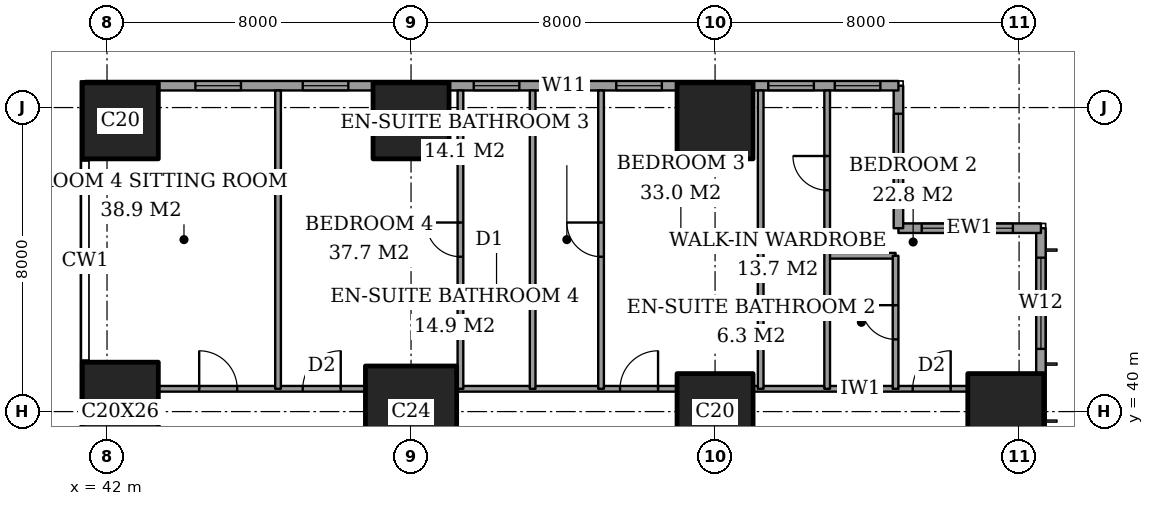
"""IFC4 building model, lengths in metres.
Left out: names, types, materials, properties, quantities, classifications, styles, units other than length and angle.
Written with IfcOpenShell. Run it as: python <this file> out.ifc"""

import sys

from ifc_helpers import new_model, si_unit, direction, frame, frame_2d, origin, origin_2d, place, context, subcontext, project, spatial, rectangle, extrude, element, fill, save


model = new_model("IFC4")
c1 = context("Model", 3, precision=1e-05, world=origin(), true_north=direction((0.0, 1.0)))
c2 = subcontext(c1, "Body", "Model", "MODEL_VIEW")
j1 = project(units=[si_unit("LENGTHUNIT", "METRE"), si_unit("PLANEANGLEUNIT", "RADIAN")], contexts=[c1])
p1 = place(None, origin())
s1 = spatial("IfcSite", under=j1, at=p1, CompositionType="ELEMENT")
p2 = place(p1, origin())
s2 = spatial("IfcBuilding", under=s1, at=p2, CompositionType="ELEMENT")
p3 = place(p2, frame((0.0, 0.0, 161.0)))
s3 = spatial("IfcBuildingStorey", under=s2, at=p3, CompositionType="ELEMENT", Elevation=161.0)
p4 = place(p3, frame((42.35, 40.0, 0.0), z_axis=(0.0, 0.0, 1.0), x_axis=(1.0, 0.0, 0.0)))
e1 = element("IfcColumn", 1, at=p4, inside=s3, PredefinedType="COLUMN", context=c2, shape_type="SweptSolid", body=[
    extrude(rectangle(XDim=2.0, YDim=2.6, at=origin_2d()), origin(), (0.0, 0.0, 1.0), 3.6),
])
p5 = place(p3, frame((42.35, 47.65, 0.0), z_axis=(0.0, 0.0, 1.0), x_axis=(1.0, 0.0, 0.0)))
e2 = element("IfcColumn", 2, at=p5, inside=s3, PredefinedType="COLUMN", context=c2, shape_type="SweptSolid", body=[
    extrude(rectangle(XDim=2.0, YDim=2.0, at=origin_2d()), origin(), (0.0, 0.0, 1.0), 3.6),
])
p6 = place(p3, frame((50.0, 40.0, 0.0), z_axis=(0.0, 0.0, 1.0), x_axis=(1.0, 0.0, 0.0)))
e3 = element("IfcColumn", 3, at=p6, inside=s3, PredefinedType="COLUMN", context=c2, shape_type="SweptSolid", body=[
    extrude(rectangle(XDim=2.4, YDim=2.4, at=origin_2d()), origin(), (0.0, 0.0, 1.0), 3.6),
])
for number, where, z_axis, x_axis in (
    (4, (50.0, 47.65, 0.0), (0.0, 0.0, 1.0), (1.0, 0.0, 0.0)),
    (5, (58.0, 40.0, 0.0), (0.0, 0.0, 1.0), (1.0, 0.0, 0.0)),
    (6, (58.0, 47.65, 0.0), (0.0, 0.0, 1.0), (1.0, 0.0, 0.0)),
    (7, (65.65, 40.0, 0.0), (0.0, 0.0, 1.0), (1.0, 0.0, 0.0)),
):
    element("IfcColumn", number, at=place(p3, frame(where, z_axis=z_axis, x_axis=x_axis)), inside=s3, PredefinedType="COLUMN", context=c2, shape_type="SweptSolid", body=[
        extrude(rectangle(XDim=2.0, YDim=2.0, at=origin_2d()), origin(), (0.0, 0.0, 1.0), 3.6),
    ])
p7 = place(p3, frame((66.575, 3.175, 0.0), z_axis=(0.0, 0.0, 1.0), x_axis=(0.0, 1.0, 0.0)))
e8 = element("IfcWall", 8, at=p7, inside=s3, PredefinedType="SOLIDWALL", context=c2, shape_type="SweptSolid", body=[
    extrude(rectangle(XDim=41.65, YDim=0.25, at=frame_2d((20.825, 0.0))), origin(), (0.0, 0.0, 1.0), 3.6),
])
p8 = place(p7, frame((0.775, 0.0, 0.4)))
e9 = element("IfcOpeningElement", 9, at=p8, cuts=e8, PredefinedType="OPENING", context=c2, shape_type="SweptSolid", body=[
    extrude(rectangle(XDim=2.4, YDim=2.2, at=frame_2d((1.2, 1.1))), frame((0.0, 0.135, 0.0), z_axis=(0.0, -1.0, 0.0), x_axis=(1.0, 0.0, 0.0)), (0.0, 0.0, 1.0), 0.27),
])
p9 = place(p7, frame((6.225, 0.0, 0.4)))
e10 = element("IfcOpeningElement", 10, at=p9, cuts=e8, PredefinedType="OPENING", context=c2, shape_type="SweptSolid", body=[
    extrude(rectangle(XDim=1.2, YDim=2.2, at=frame_2d((0.6, 1.1))), frame((0.0, 0.135, 0.0), z_axis=(0.0, -1.0, 0.0), x_axis=(1.0, 0.0, 0.0)), (0.0, 0.0, 1.0), 0.27),
])
p10 = place(p7, frame((8.475, 0.0, 0.4)))
e11 = element("IfcOpeningElement", 11, at=p10, cuts=e8, PredefinedType="OPENING", context=c2, shape_type="SweptSolid", body=[
    extrude(rectangle(XDim=2.4, YDim=2.2, at=frame_2d((1.2, 1.1))), frame((0.0, 0.135, 0.0), z_axis=(0.0, -1.0, 0.0), x_axis=(1.0, 0.0, 0.0)), (0.0, 0.0, 1.0), 0.27),
])
p11 = place(p7, frame((15.775, 0.0, 0.4)))
e12 = element("IfcOpeningElement", 12, at=p11, cuts=e8, PredefinedType="OPENING", context=c2, shape_type="SweptSolid", body=[
    extrude(rectangle(XDim=2.4, YDim=2.2, at=frame_2d((1.2, 1.1))), frame((0.0, 0.135, 0.0), z_axis=(0.0, -1.0, 0.0), x_axis=(1.0, 0.0, 0.0)), (0.0, 0.0, 1.0), 0.27),
])
p12 = place(p7, frame((23.475, 0.0, 0.4)))
e13 = element("IfcOpeningElement", 13, at=p12, cuts=e8, PredefinedType="OPENING", context=c2, shape_type="SweptSolid", body=[
    extrude(rectangle(XDim=2.4, YDim=2.2, at=frame_2d((1.2, 1.1))), frame((0.0, 0.135, 0.0), z_axis=(0.0, -1.0, 0.0), x_axis=(1.0, 0.0, 0.0)), (0.0, 0.0, 1.0), 0.27),
])
p13 = place(p7, frame((30.975, 0.0, 0.4)))
e14 = element("IfcOpeningElement", 14, at=p13, cuts=e8, PredefinedType="OPENING", context=c2, shape_type="SweptSolid", body=[
    extrude(rectangle(XDim=2.4, YDim=2.2, at=frame_2d((1.2, 1.1))), frame((0.0, 0.135, 0.0), z_axis=(0.0, -1.0, 0.0), x_axis=(1.0, 0.0, 0.0)), (0.0, 0.0, 1.0), 0.27),
])
p14 = place(p7, frame((34.5, 0.0, 0.4)))
e15 = element("IfcOpeningElement", 15, at=p14, cuts=e8, PredefinedType="OPENING", context=c2, shape_type="SweptSolid", body=[
    extrude(rectangle(XDim=1.2, YDim=2.2, at=frame_2d((0.6, 1.1))), frame((0.0, 0.135, 0.0), z_axis=(0.0, -1.0, 0.0), x_axis=(1.0, 0.0, 0.0)), (0.0, 0.0, 1.0), 0.27),
])
p15 = place(p7, frame((38.475, 0.0, 0.4)))
e16 = element("IfcOpeningElement", 16, at=p15, cuts=e8, PredefinedType="OPENING", context=c2, shape_type="SweptSolid", body=[
    extrude(rectangle(XDim=2.4, YDim=2.2, at=frame_2d((1.2, 1.1))), frame((0.0, 0.135, 0.0), z_axis=(0.0, -1.0, 0.0), x_axis=(1.0, 0.0, 0.0)), (0.0, 0.0, 1.0), 0.27),
])
p16 = place(p3, frame((66.575, 44.825, 0.0), z_axis=(0.0, 0.0, 1.0), x_axis=(-1.0, 0.0, 0.0)))
e17 = element("IfcWall", 17, at=p16, inside=s3, PredefinedType="SOLIDWALL", context=c2, shape_type="SweptSolid", body=[
    extrude(rectangle(XDim=3.75, YDim=0.25, at=frame_2d((1.875, 0.0))), origin(), (0.0, 0.0, 1.0), 3.6),
])
p17 = place(p16, frame((0.738, 0.0, 0.4)))
e18 = element("IfcOpeningElement", 18, at=p17, cuts=e17, PredefinedType="OPENING", context=c2, shape_type="SweptSolid", body=[
    extrude(rectangle(XDim=2.4, YDim=2.2, at=frame_2d((1.2, 1.1))), frame((0.0, 0.135, 0.0), z_axis=(0.0, -1.0, 0.0), x_axis=(1.0, 0.0, 0.0)), (0.0, 0.0, 1.0), 0.27),
])
p18 = place(p3, frame((62.825, 44.825, 0.0), z_axis=(0.0, 0.0, 1.0), x_axis=(0.0, 1.0, 0.0)))
e19 = element("IfcWall", 19, at=p18, inside=s3, PredefinedType="SOLIDWALL", context=c2, shape_type="SweptSolid", body=[
    extrude(rectangle(XDim=3.75, YDim=0.25, at=frame_2d((1.875, 0.0))), origin(), (0.0, 0.0, 1.0), 3.6),
])
p19 = place(p18, frame((0.613, 0.0, 0.4)))
e20 = element("IfcOpeningElement", 20, at=p19, cuts=e19, PredefinedType="OPENING", context=c2, shape_type="SweptSolid", body=[
    extrude(rectangle(XDim=2.4, YDim=2.2, at=frame_2d((1.2, 1.1))), frame((0.0, 0.135, 0.0), z_axis=(0.0, -1.0, 0.0), x_axis=(1.0, 0.0, 0.0)), (0.0, 0.0, 1.0), 0.27),
])
p20 = place(p3, frame((62.825, 48.575, 0.0), z_axis=(0.0, 0.0, 1.0), x_axis=(-1.0, 0.0, 0.0)))
e21 = element("IfcWall", 21, at=p20, inside=s3, PredefinedType="SOLIDWALL", context=c2, shape_type="SweptSolid", body=[
    extrude(rectangle(XDim=21.4, YDim=0.25, at=frame_2d((10.7, 0.0))), origin(), (0.0, 0.0, 1.0), 3.6),
])
p21 = place(p20, frame((0.475, 0.0, 0.4)))
e22 = element("IfcOpeningElement", 22, at=p21, cuts=e21, PredefinedType="OPENING", context=c2, shape_type="SweptSolid", body=[
    extrude(rectangle(XDim=1.2, YDim=2.2, at=frame_2d((0.6, 1.1))), frame((0.0, 0.135, 0.0), z_axis=(0.0, -1.0, 0.0), x_axis=(1.0, 0.0, 0.0)), (0.0, 0.0, 1.0), 0.27),
])
p22 = place(p20, frame((2.225, 0.0, 0.4)))
e23 = element("IfcOpeningElement", 23, at=p22, cuts=e21, PredefinedType="OPENING", context=c2, shape_type="SweptSolid", body=[
    extrude(rectangle(XDim=1.2, YDim=2.2, at=frame_2d((0.6, 1.1))), frame((0.0, 0.135, 0.0), z_axis=(0.0, -1.0, 0.0), x_axis=(1.0, 0.0, 0.0)), (0.0, 0.0, 1.0), 0.27),
])
p23 = place(p20, frame((6.225, 0.0, 0.4)))
e24 = element("IfcOpeningElement", 24, at=p23, cuts=e21, PredefinedType="OPENING", context=c2, shape_type="SweptSolid", body=[
    extrude(rectangle(XDim=1.2, YDim=2.2, at=frame_2d((0.6, 1.1))), frame((0.0, 0.135, 0.0), z_axis=(0.0, -1.0, 0.0), x_axis=(1.0, 0.0, 0.0)), (0.0, 0.0, 1.0), 0.27),
])
p24 = place(p20, frame((8.2, 0.0, 0.4)))
e25 = element("IfcOpeningElement", 25, at=p24, cuts=e21, PredefinedType="OPENING", context=c2, shape_type="SweptSolid", body=[
    extrude(rectangle(XDim=1.2, YDim=2.2, at=frame_2d((0.6, 1.1))), frame((0.0, 0.135, 0.0), z_axis=(0.0, -1.0, 0.0), x_axis=(1.0, 0.0, 0.0)), (0.0, 0.0, 1.0), 0.27),
])
p25 = place(p20, frame((9.975, 0.0, 0.4)))
e26 = element("IfcOpeningElement", 26, at=p25, cuts=e21, PredefinedType="OPENING", context=c2, shape_type="SweptSolid", body=[
    extrude(rectangle(XDim=1.2, YDim=2.2, at=frame_2d((0.6, 1.1))), frame((0.0, 0.135, 0.0), z_axis=(0.0, -1.0, 0.0), x_axis=(1.0, 0.0, 0.0)), (0.0, 0.0, 1.0), 0.27),
])
p26 = place(p20, frame((14.475, 0.0, 0.4)))
e27 = element("IfcOpeningElement", 27, at=p26, cuts=e21, PredefinedType="OPENING", context=c2, shape_type="SweptSolid", body=[
    extrude(rectangle(XDim=1.2, YDim=2.2, at=frame_2d((0.6, 1.1))), frame((0.0, 0.135, 0.0), z_axis=(0.0, -1.0, 0.0), x_axis=(1.0, 0.0, 0.0)), (0.0, 0.0, 1.0), 0.27),
])
p27 = place(p20, frame((17.3, 0.0, 0.4)))
e28 = element("IfcOpeningElement", 28, at=p27, cuts=e21, PredefinedType="OPENING", context=c2, shape_type="SweptSolid", body=[
    extrude(rectangle(XDim=1.2, YDim=2.2, at=frame_2d((0.6, 1.1))), frame((0.0, 0.135, 0.0), z_axis=(0.0, -1.0, 0.0), x_axis=(1.0, 0.0, 0.0)), (0.0, 0.0, 1.0), 0.27),
])
p28 = place(p3, frame((43.35, 40.6, 0.0), z_axis=(0.0, 0.0, 1.0), x_axis=(1.0, 0.0, 0.0)))
e29 = element("IfcWall", 29, at=p28, inside=s3, PredefinedType="PARTITIONING", context=c2, shape_type="SweptSolid", body=[
    extrude(rectangle(XDim=5.45, YDim=0.15, at=frame_2d((2.725, 0.0))), origin(), (0.0, 0.0, 1.0), 3.35),
])
p29 = place(p28, frame((3.8, 0.0, 0.0)))
e30 = element("IfcOpeningElement", 30, at=p29, cuts=e29, PredefinedType="OPENING", context=c2, shape_type="SweptSolid", body=[
    extrude(rectangle(XDim=1.0, YDim=2.1, at=frame_2d((0.5, 1.05))), frame((0.0, 0.085, 0.0), z_axis=(0.0, -1.0, 0.0), x_axis=(1.0, 0.0, 0.0)), (0.0, 0.0, 1.0), 0.17),
])
p30 = place(p28, frame((1.075, 0.0, 0.0)))
e31 = element("IfcOpeningElement", 31, at=p30, cuts=e29, PredefinedType="OPENING", context=c2, shape_type="SweptSolid", body=[
    extrude(rectangle(XDim=1.0, YDim=2.1, at=frame_2d((0.5, 1.05))), frame((0.0, 0.085, 0.0), z_axis=(0.0, -1.0, 0.0), x_axis=(1.0, 0.0, 0.0)), (0.0, 0.0, 1.0), 0.17),
])
p31 = place(p3, frame((51.2, 40.6, 0.0), z_axis=(0.0, 0.0, 1.0), x_axis=(1.0, 0.0, 0.0)))
e32 = element("IfcWall", 32, at=p31, inside=s3, PredefinedType="PARTITIONING", context=c2, shape_type="SweptSolid", body=[
    extrude(rectangle(XDim=5.8, YDim=0.15, at=frame_2d((2.9, 0.0))), origin(), (0.0, 0.0, 1.0), 3.35),
])
p32 = place(p31, frame((4.3, 0.0, 0.0)))
e33 = element("IfcOpeningElement", 33, at=p32, cuts=e32, PredefinedType="OPENING", context=c2, shape_type="SweptSolid", body=[
    extrude(rectangle(XDim=1.0, YDim=2.1, at=frame_2d((0.5, 1.05))), frame((0.0, 0.085, 0.0), z_axis=(0.0, -1.0, 0.0), x_axis=(1.0, 0.0, 0.0)), (0.0, 0.0, 1.0), 0.17),
])
p33 = place(p3, frame((59.0, 40.6, 0.0), z_axis=(0.0, 0.0, 1.0), x_axis=(1.0, 0.0, 0.0)))
e34 = element("IfcWall", 34, at=p33, inside=s3, PredefinedType="PARTITIONING", context=c2, shape_type="SweptSolid", body=[
    extrude(rectangle(XDim=5.65, YDim=0.15, at=frame_2d((2.825, 0.0))), origin(), (0.0, 0.0, 1.0), 3.35),
])
p34 = place(p33, frame((4.2, 0.0, 0.0)))
e35 = element("IfcOpeningElement", 35, at=p34, cuts=e34, PredefinedType="OPENING", context=c2, shape_type="SweptSolid", body=[
    extrude(rectangle(XDim=1.0, YDim=2.1, at=frame_2d((0.5, 1.05))), frame((0.0, 0.085, 0.0), z_axis=(0.0, -1.0, 0.0), x_axis=(1.0, 0.0, 0.0)), (0.0, 0.0, 1.0), 0.17),
])
p35 = place(p3, frame((60.95, 44.1, 0.0), z_axis=(0.0, 0.0, 1.0), x_axis=(1.0, 0.0, 0.0)))
e36 = element("IfcWall", 36, at=p35, inside=s3, PredefinedType="PARTITIONING", context=c2, shape_type="SweptSolid", body=[
    extrude(rectangle(XDim=1.8, YDim=0.15, at=frame_2d((0.9, 0.0))), origin(), (0.0, 0.0, 1.0), 3.35),
])
p36 = place(p3, frame((46.5, 40.6, 0.0), z_axis=(0.0, 0.0, 1.0), x_axis=(0.0, 1.0, 0.0)))
e37 = element("IfcWall", 37, at=p36, inside=s3, PredefinedType="PARTITIONING", context=c2, shape_type="SweptSolid", body=[
    extrude(rectangle(XDim=7.85, YDim=0.15, at=frame_2d((3.925, 0.0))), origin(), (0.0, 0.0, 1.0), 3.35),
])
p37 = place(p3, frame((51.3, 40.6, 0.0), z_axis=(0.0, 0.0, 1.0), x_axis=(0.0, 1.0, 0.0)))
e38 = element("IfcWall", 38, at=p37, inside=s3, PredefinedType="PARTITIONING", context=c2, shape_type="SweptSolid", body=[
    extrude(rectangle(XDim=7.85, YDim=0.15, at=frame_2d((3.925, 0.0))), origin(), (0.0, 0.0, 1.0), 3.35),
])
p38 = place(p37, frame((3.475, 0.0, 0.0)))
e39 = element("IfcOpeningElement", 39, at=p38, cuts=e38, PredefinedType="OPENING", context=c2, shape_type="SweptSolid", body=[
    extrude(rectangle(XDim=0.9, YDim=2.1, at=frame_2d((0.45, 1.05))), frame((0.0, 0.085, 0.0), z_axis=(0.0, -1.0, 0.0), x_axis=(1.0, 0.0, 0.0)), (0.0, 0.0, 1.0), 0.17),
])
p39 = place(p3, frame((53.2, 40.6, 0.0), z_axis=(0.0, 0.0, 1.0), x_axis=(0.0, 1.0, 0.0)))
e40 = element("IfcWall", 40, at=p39, inside=s3, PredefinedType="PARTITIONING", context=c2, shape_type="SweptSolid", body=[
    extrude(rectangle(XDim=7.85, YDim=0.15, at=frame_2d((3.925, 0.0))), origin(), (0.0, 0.0, 1.0), 3.35),
])
p40 = place(p3, frame((55.0, 40.6, 0.0), z_axis=(0.0, 0.0, 1.0), x_axis=(0.0, 1.0, 0.0)))
e41 = element("IfcWall", 41, at=p40, inside=s3, PredefinedType="PARTITIONING", context=c2, shape_type="SweptSolid", body=[
    extrude(rectangle(XDim=7.85, YDim=0.15, at=frame_2d((3.925, 0.0))), origin(), (0.0, 0.0, 1.0), 3.35),
])
p41 = place(p40, frame((3.475, 0.0, 0.0)))
e42 = element("IfcOpeningElement", 42, at=p41, cuts=e41, PredefinedType="OPENING", context=c2, shape_type="SweptSolid", body=[
    extrude(rectangle(XDim=0.9, YDim=2.1, at=frame_2d((0.45, 1.05))), frame((0.0, 0.085, 0.0), z_axis=(0.0, -1.0, 0.0), x_axis=(1.0, 0.0, 0.0)), (0.0, 0.0, 1.0), 0.17),
])
p42 = place(p3, frame((59.2, 40.6, 0.0), z_axis=(0.0, 0.0, 1.0), x_axis=(0.0, 1.0, 0.0)))
e43 = element("IfcWall", 43, at=p42, inside=s3, PredefinedType="PARTITIONING", context=c2, shape_type="SweptSolid", body=[
    extrude(rectangle(XDim=7.85, YDim=0.15, at=frame_2d((3.925, 0.0))), origin(), (0.0, 0.0, 1.0), 3.35),
])
p43 = place(p3, frame((60.95, 40.6, 0.0), z_axis=(0.0, 0.0, 1.0), x_axis=(0.0, 1.0, 0.0)))
e44 = element("IfcWall", 44, at=p43, inside=s3, PredefinedType="PARTITIONING", context=c2, shape_type="SweptSolid", body=[
    extrude(rectangle(XDim=7.85, YDim=0.15, at=frame_2d((3.925, 0.0))), origin(), (0.0, 0.0, 1.0), 3.35),
])
p44 = place(p43, frame((5.225, 0.0, 0.0)))
e45 = element("IfcOpeningElement", 45, at=p44, cuts=e44, PredefinedType="OPENING", context=c2, shape_type="SweptSolid", body=[
    extrude(rectangle(XDim=0.9, YDim=2.1, at=frame_2d((0.45, 1.05))), frame((0.0, 0.085, 0.0), z_axis=(0.0, -1.0, 0.0), x_axis=(1.0, 0.0, 0.0)), (0.0, 0.0, 1.0), 0.17),
])
p45 = place(p3, frame((62.75, 40.6, 0.0), z_axis=(0.0, 0.0, 1.0), x_axis=(0.0, 1.0, 0.0)))
e46 = element("IfcWall", 46, at=p45, inside=s3, PredefinedType="PARTITIONING", context=c2, shape_type="SweptSolid", body=[
    extrude(rectangle(XDim=3.5, YDim=0.15, at=frame_2d((1.75, 0.0))), origin(), (0.0, 0.0, 1.0), 3.35),
])
p46 = place(p45, frame((1.3, 0.0, 0.0)))
e47 = element("IfcOpeningElement", 47, at=p46, cuts=e46, PredefinedType="OPENING", context=c2, shape_type="SweptSolid", body=[
    extrude(rectangle(XDim=0.9, YDim=2.1, at=frame_2d((0.45, 1.05))), frame((0.0, 0.085, 0.0), z_axis=(0.0, -1.0, 0.0), x_axis=(1.0, 0.0, 0.0)), (0.0, 0.0, 1.0), 0.17),
])
p47 = place(p15, origin())
e48 = element("IfcWindow", 48, at=p47, inside=s3, PartitioningType="SINGLE_PANEL", PredefinedType="WINDOW", context=c2, shape_type="SweptSolid", body=[
    extrude(rectangle(XDim=2.4, YDim=2.2, at=frame_2d((1.2, 1.1))), frame((0.0, 0.03, 0.0), z_axis=(0.0, -1.0, 0.0), x_axis=(1.0, 0.0, 0.0)), (0.0, 0.0, 1.0), 0.06),
])
fill(e16, e48)
p48 = place(p17, origin())
e49 = element("IfcWindow", 49, at=p48, inside=s3, PartitioningType="SINGLE_PANEL", PredefinedType="WINDOW", context=c2, shape_type="SweptSolid", body=[
    extrude(rectangle(XDim=2.4, YDim=2.2, at=frame_2d((1.2, 1.1))), frame((0.0, 0.03, 0.0), z_axis=(0.0, -1.0, 0.0), x_axis=(1.0, 0.0, 0.0)), (0.0, 0.0, 1.0), 0.06),
])
fill(e18, e49)
p49 = place(p19, origin())
e50 = element("IfcWindow", 50, at=p49, inside=s3, PartitioningType="SINGLE_PANEL", PredefinedType="WINDOW", context=c2, shape_type="SweptSolid", body=[
    extrude(rectangle(XDim=2.4, YDim=2.2, at=frame_2d((1.2, 1.1))), frame((0.0, 0.03, 0.0), z_axis=(0.0, -1.0, 0.0), x_axis=(1.0, 0.0, 0.0)), (0.0, 0.0, 1.0), 0.06),
])
fill(e20, e50)
p50 = place(p21, origin())
e51 = element("IfcWindow", 51, at=p50, inside=s3, PartitioningType="SINGLE_PANEL", PredefinedType="WINDOW", context=c2, shape_type="SweptSolid", body=[
    extrude(rectangle(XDim=1.2, YDim=2.2, at=frame_2d((0.6, 1.1))), frame((0.0, 0.03, 0.0), z_axis=(0.0, -1.0, 0.0), x_axis=(1.0, 0.0, 0.0)), (0.0, 0.0, 1.0), 0.06),
])
fill(e22, e51)
p51 = place(p22, origin())
e52 = element("IfcWindow", 52, at=p51, inside=s3, PartitioningType="SINGLE_PANEL", PredefinedType="WINDOW", context=c2, shape_type="SweptSolid", body=[
    extrude(rectangle(XDim=1.2, YDim=2.2, at=frame_2d((0.6, 1.1))), frame((0.0, 0.03, 0.0), z_axis=(0.0, -1.0, 0.0), x_axis=(1.0, 0.0, 0.0)), (0.0, 0.0, 1.0), 0.06),
])
fill(e23, e52)
p52 = place(p23, origin())
e53 = element("IfcWindow", 53, at=p52, inside=s3, PartitioningType="SINGLE_PANEL", PredefinedType="WINDOW", context=c2, shape_type="SweptSolid", body=[
    extrude(rectangle(XDim=1.2, YDim=2.2, at=frame_2d((0.6, 1.1))), frame((0.0, 0.03, 0.0), z_axis=(0.0, -1.0, 0.0), x_axis=(1.0, 0.0, 0.0)), (0.0, 0.0, 1.0), 0.06),
])
fill(e24, e53)
p53 = place(p24, origin())
e54 = element("IfcWindow", 54, at=p53, inside=s3, PartitioningType="SINGLE_PANEL", PredefinedType="WINDOW", context=c2, shape_type="SweptSolid", body=[
    extrude(rectangle(XDim=1.2, YDim=2.2, at=frame_2d((0.6, 1.1))), frame((0.0, 0.03, 0.0), z_axis=(0.0, -1.0, 0.0), x_axis=(1.0, 0.0, 0.0)), (0.0, 0.0, 1.0), 0.06),
])
fill(e25, e54)
p54 = place(p25, origin())
e55 = element("IfcWindow", 55, at=p54, inside=s3, PartitioningType="SINGLE_PANEL", PredefinedType="WINDOW", context=c2, shape_type="SweptSolid", body=[
    extrude(rectangle(XDim=1.2, YDim=2.2, at=frame_2d((0.6, 1.1))), frame((0.0, 0.03, 0.0), z_axis=(0.0, -1.0, 0.0), x_axis=(1.0, 0.0, 0.0)), (0.0, 0.0, 1.0), 0.06),
])
fill(e26, e55)
p55 = place(p26, origin())
e56 = element("IfcWindow", 56, at=p55, inside=s3, PartitioningType="SINGLE_PANEL", PredefinedType="WINDOW", context=c2, shape_type="SweptSolid", body=[
    extrude(rectangle(XDim=1.2, YDim=2.2, at=frame_2d((0.6, 1.1))), frame((0.0, 0.03, 0.0), z_axis=(0.0, -1.0, 0.0), x_axis=(1.0, 0.0, 0.0)), (0.0, 0.0, 1.0), 0.06),
])
fill(e27, e56)
p56 = place(p27, origin())
e57 = element("IfcWindow", 57, at=p56, inside=s3, PartitioningType="SINGLE_PANEL", PredefinedType="WINDOW", context=c2, shape_type="SweptSolid", body=[
    extrude(rectangle(XDim=1.2, YDim=2.2, at=frame_2d((0.6, 1.1))), frame((0.0, 0.03, 0.0), z_axis=(0.0, -1.0, 0.0), x_axis=(1.0, 0.0, 0.0)), (0.0, 0.0, 1.0), 0.06),
])
fill(e28, e57)
p57 = place(p46, origin())
e58 = element("IfcDoor", 58, at=p57, inside=s3, OperationType="SINGLE_SWING_LEFT", PredefinedType="DOOR", context=c2, shape_type="SweptSolid", body=[
    extrude(rectangle(XDim=0.9, YDim=2.1, at=frame_2d((0.45, 1.05))), frame((0.0, 0.025, 0.0), z_axis=(0.0, -1.0, 0.0), x_axis=(1.0, 0.0, 0.0)), (0.0, 0.0, 1.0), 0.05),
])
fill(e47, e58)
p58 = place(p34, origin())
e59 = element("IfcDoor", 59, at=p58, inside=s3, OperationType="SINGLE_SWING_LEFT", PredefinedType="DOOR", context=c2, shape_type="SweptSolid", body=[
    extrude(rectangle(XDim=1.0, YDim=2.1, at=frame_2d((0.5, 1.05))), frame((0.0, 0.025, 0.0), z_axis=(0.0, -1.0, 0.0), x_axis=(1.0, 0.0, 0.0)), (0.0, 0.0, 1.0), 0.05),
])
fill(e35, e59)
p59 = place(p44, origin())
e60 = element("IfcDoor", 60, at=p59, inside=s3, OperationType="SINGLE_SWING_LEFT", PredefinedType="DOOR", context=c2, shape_type="SweptSolid", body=[
    extrude(rectangle(XDim=0.9, YDim=2.1, at=frame_2d((0.45, 1.05))), frame((0.0, 0.025, 0.0), z_axis=(0.0, -1.0, 0.0), x_axis=(1.0, 0.0, 0.0)), (0.0, 0.0, 1.0), 0.05),
])
fill(e45, e60)
p60 = place(p32, origin())
e61 = element("IfcDoor", 61, at=p60, inside=s3, OperationType="SINGLE_SWING_LEFT", PredefinedType="DOOR", context=c2, shape_type="SweptSolid", body=[
    extrude(rectangle(XDim=1.0, YDim=2.1, at=frame_2d((0.5, 1.05))), frame((0.0, 0.025, 0.0), z_axis=(0.0, -1.0, 0.0), x_axis=(1.0, 0.0, 0.0)), (0.0, 0.0, 1.0), 0.05),
])
fill(e33, e61)
p61 = place(p41, origin())
e62 = element("IfcDoor", 62, at=p61, inside=s3, OperationType="SINGLE_SWING_LEFT", PredefinedType="DOOR", context=c2, shape_type="SweptSolid", body=[
    extrude(rectangle(XDim=0.9, YDim=2.1, at=frame_2d((0.45, 1.05))), frame((0.0, 0.025, 0.0), z_axis=(0.0, -1.0, 0.0), x_axis=(1.0, 0.0, 0.0)), (0.0, 0.0, 1.0), 0.05),
])
fill(e42, e62)
p62 = place(p38, origin())
e63 = element("IfcDoor", 63, at=p62, inside=s3, OperationType="SINGLE_SWING_LEFT", PredefinedType="DOOR", context=c2, shape_type="SweptSolid", body=[
    extrude(rectangle(XDim=0.9, YDim=2.1, at=frame_2d((0.45, 1.05))), frame((0.0, 0.025, 0.0), z_axis=(0.0, -1.0, 0.0), x_axis=(1.0, 0.0, 0.0)), (0.0, 0.0, 1.0), 0.05),
])
fill(e39, e63)
p63 = place(p29, origin())
e64 = element("IfcDoor", 64, at=p63, inside=s3, OperationType="SINGLE_SWING_LEFT", PredefinedType="DOOR", context=c2, shape_type="SweptSolid", body=[
    extrude(rectangle(XDim=1.0, YDim=2.1, at=frame_2d((0.5, 1.05))), frame((0.0, 0.025, 0.0), z_axis=(0.0, -1.0, 0.0), x_axis=(1.0, 0.0, 0.0)), (0.0, 0.0, 1.0), 0.05),
])
fill(e30, e64)
p64 = place(p30, origin())
e65 = element("IfcDoor", 65, at=p64, inside=s3, OperationType="SINGLE_SWING_RIGHT", PredefinedType="DOOR", context=c2, shape_type="SweptSolid", body=[
    extrude(rectangle(XDim=1.0, YDim=2.1, at=frame_2d((0.5, 1.05))), frame((0.0, 0.025, 0.0), z_axis=(0.0, -1.0, 0.0), x_axis=(1.0, 0.0, 0.0)), (0.0, 0.0, 1.0), 0.05),
])
fill(e31, e65)
save(model, sys.argv[1])
